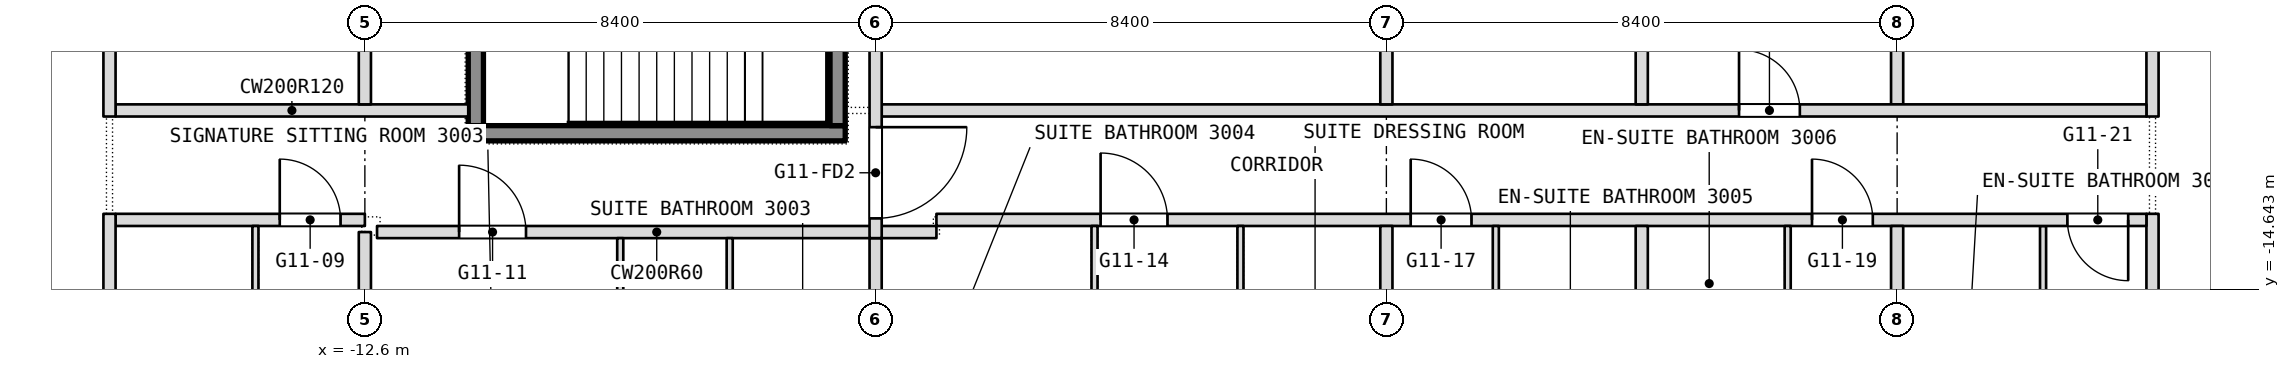
"""IFC4 building model, lengths in metres.
Left out: names, types, materials, properties, quantities, classifications, styles, units other than length and angle.
Written with IfcOpenShell. Run it as: python <this file> out.ifc"""

import sys

from ifc_helpers import new_model, si_unit, direction, frame, frame_2d, origin, place, context, subcontext, project, spatial, rectangle, extrude, element, fill, save


model = new_model("IFC4")
c1 = context("Model", 3, precision=1e-05, world=origin(), true_north=direction((0.0, 1.0)))
c2 = subcontext(c1, "Body", "Model", "MODEL_VIEW")
j1 = project(units=[si_unit("LENGTHUNIT", "METRE"), si_unit("PLANEANGLEUNIT", "RADIAN")], contexts=[c1])
p1 = place(None, origin())
s1 = spatial("IfcSite", under=j1, at=p1, CompositionType="ELEMENT")
p2 = place(p1, origin())
s2 = spatial("IfcBuilding", under=s1, at=p2, CompositionType="ELEMENT")
p3 = place(p2, frame((0.0, 0.0, 133.7)))
s3 = spatial("IfcBuildingStorey", under=s2, at=p3, CompositionType="ELEMENT", Elevation=133.7)
p4 = place(p3, frame((16.8, -22.186, 0.0), z_axis=(0.0, 0.0, 1.0), x_axis=(0.0, 1.0, 0.0)))
e1 = element("IfcWall", 1, at=p4, inside=s3, PredefinedType="PARTITIONING", context=c2, shape_type="SweptSolid", body=[
    extrude(rectangle(XDim=8.786, YDim=0.2, at=frame_2d((4.393, 0.0))), origin(), (0.0, 0.0, 1.0), 3.34),
])
p5 = place(p3, frame((16.8, -11.8, 0.0), z_axis=(0.0, 0.0, 1.0), x_axis=(0.0, 1.0, 0.0)))
e2 = element("IfcWall", 2, at=p5, inside=s3, PredefinedType="PARTITIONING", context=c2, shape_type="SweptSolid", body=[
    extrude(rectangle(XDim=9.9, YDim=0.2, at=frame_2d((4.95, 0.0))), origin(), (0.0, 0.0, 1.0), 3.34),
])
p6 = place(p3, frame((15.0, -17.35, 0.0), z_axis=(0.0, 0.0, 1.0), x_axis=(0.0, 1.0, 0.0)))
e3 = element("IfcWall", 3, at=p6, inside=s3, PredefinedType="PARTITIONING", context=c2, shape_type="SweptSolid", body=[
    extrude(rectangle(XDim=3.75, YDim=0.1, at=frame_2d((1.875, 0.0))), origin(), (0.0, 0.0, 1.0), 3.34),
])
p7 = place(p3, frame((-12.4, -13.7, 0.0), z_axis=(0.0, 0.0, 1.0), x_axis=(1.0, 0.0, 0.0)))
e4 = element("IfcWall", 4, at=p7, inside=s3, PredefinedType="PARTITIONING", context=c2, shape_type="SweptSolid", body=[
    extrude(rectangle(XDim=9.2, YDim=0.2, at=frame_2d((4.6, 0.0))), origin(), (0.0, 0.0, 1.0), 3.34),
])
p8 = place(p7, frame((1.35, 0.0, 0.0)))
e5 = element("IfcOpeningElement", 5, at=p8, cuts=e4, PredefinedType="OPENING", context=c2, shape_type="SweptSolid", body=[
    extrude(rectangle(XDim=1.1, YDim=2.1, at=frame_2d((0.55, 1.05))), frame((0.0, 0.1, 0.0), z_axis=(0.0, -1.0, 0.0), x_axis=(1.0, 0.0, 0.0)), (0.0, 0.0, 1.0), 0.2),
])
p9 = place(p3, frame((-16.7, -13.5, 0.0), z_axis=(0.0, 0.0, 1.0), x_axis=(1.0, 0.0, 0.0)))
e6 = element("IfcWall", 6, at=p9, inside=s3, PredefinedType="PARTITIONING", context=c2, shape_type="SweptSolid", body=[
    extrude(rectangle(XDim=4.1, YDim=0.2, at=frame_2d((2.05, 0.0))), origin(), (0.0, 0.0, 1.0), 3.34),
])
p10 = place(p9, frame((2.7, 0.0, 0.0)))
e7 = element("IfcOpeningElement", 7, at=p10, cuts=e6, PredefinedType="OPENING", context=c2, shape_type="SweptSolid", body=[
    extrude(rectangle(XDim=1.0, YDim=2.1, at=frame_2d((0.5, 1.05))), frame((0.0, 0.1, 0.0), z_axis=(0.0, -1.0, 0.0), x_axis=(1.0, 0.0, 0.0)), (0.0, 0.0, 1.0), 0.2),
])
p11 = place(p3, frame((-3.2, -13.5, 0.0), z_axis=(0.0, 0.0, 1.0), x_axis=(1.0, 0.0, 0.0)))
e8 = element("IfcWall", 8, at=p11, inside=s3, PredefinedType="PARTITIONING", context=c2, shape_type="SweptSolid", body=[
    extrude(rectangle(XDim=19.9, YDim=0.2, at=frame_2d((9.95, 0.0))), origin(), (0.0, 0.0, 1.0), 3.34),
])
p12 = place(p11, frame((2.7, 0.0, 0.0)))
e9 = element("IfcOpeningElement", 9, at=p12, cuts=e8, PredefinedType="OPENING", context=c2, shape_type="SweptSolid", body=[
    extrude(rectangle(XDim=1.1, YDim=2.1, at=frame_2d((0.55, 1.05))), frame((0.0, 0.1, 0.0), z_axis=(0.0, -1.0, 0.0), x_axis=(1.0, 0.0, 0.0)), (0.0, 0.0, 1.0), 0.2),
])
p13 = place(p11, frame((7.8, 0.0, 0.0)))
e10 = element("IfcOpeningElement", 10, at=p13, cuts=e8, PredefinedType="OPENING", context=c2, shape_type="SweptSolid", body=[
    extrude(rectangle(XDim=1.0, YDim=2.1, at=frame_2d((0.5, 1.05))), frame((0.0, 0.1, 0.0), z_axis=(0.0, -1.0, 0.0), x_axis=(1.0, 0.0, 0.0)), (0.0, 0.0, 1.0), 0.2),
])
p14 = place(p11, frame((14.4, 0.0, 0.0)))
e11 = element("IfcOpeningElement", 11, at=p14, cuts=e8, PredefinedType="OPENING", context=c2, shape_type="SweptSolid", body=[
    extrude(rectangle(XDim=1.0, YDim=2.1, at=frame_2d((0.5, 1.05))), frame((0.0, 0.1, 0.0), z_axis=(0.0, -1.0, 0.0), x_axis=(1.0, 0.0, 0.0)), (0.0, 0.0, 1.0), 0.2),
])
p15 = place(p11, frame((18.6, 0.0, 0.0)))
e12 = element("IfcOpeningElement", 12, at=p15, cuts=e8, PredefinedType="OPENING", context=c2, shape_type="SweptSolid", body=[
    extrude(rectangle(XDim=1.0, YDim=2.1, at=frame_2d((0.5, 1.05))), frame((0.0, 0.1, 0.0), z_axis=(0.0, -1.0, 0.0), x_axis=(1.0, 0.0, 0.0)), (0.0, 0.0, 1.0), 0.2),
])
p16 = place(p3, frame((12.6, -21.175, 0.0), z_axis=(0.0, 0.0, 1.0), x_axis=(0.0, 1.0, 0.0)))
e13 = element("IfcWall", 13, at=p16, inside=s3, PredefinedType="PARTITIONING", context=c2, shape_type="SweptSolid", body=[
    extrude(rectangle(XDim=7.575, YDim=0.2, at=frame_2d((3.788, 0.0))), origin(), (0.0, 0.0, 1.0), 3.34),
])
p17 = place(p3, frame((12.6, -11.6, 0.0), z_axis=(0.0, 0.0, 1.0), x_axis=(0.0, 1.0, 0.0)))
e14 = element("IfcWall", 14, at=p17, inside=s3, PredefinedType="PARTITIONING", context=c2, shape_type="SweptSolid", body=[
    extrude(rectangle(XDim=3.9, YDim=0.2, at=frame_2d((1.95, 0.0))), origin(), (0.0, 0.0, 1.0), 3.34),
])
p18 = place(p3, frame((-16.7, -11.7, 0.0), z_axis=(0.0, 0.0, 1.0), x_axis=(1.0, 0.0, 0.0)))
e15 = element("IfcWall", 15, at=p18, inside=s3, PredefinedType="PARTITIONING", context=c2, shape_type="SweptSolid", body=[
    extrude(rectangle(XDim=5.8, YDim=0.2, at=frame_2d((2.9, 0.0))), origin(), (0.0, 0.0, 1.0), 3.34),
])
p19 = place(p3, frame((-4.1, -11.7, 0.0), z_axis=(0.0, 0.0, 1.0), x_axis=(1.0, 0.0, 0.0)))
e16 = element("IfcWall", 16, at=p19, inside=s3, PredefinedType="PARTITIONING", context=c2, shape_type="SweptSolid", body=[
    extrude(rectangle(XDim=20.8, YDim=0.2, at=frame_2d((10.4, 0.0))), origin(), (0.0, 0.0, 1.0), 3.34),
])
p20 = place(p19, frame((14.1, 0.0, 0.0)))
e17 = element("IfcOpeningElement", 17, at=p20, cuts=e16, PredefinedType="OPENING", context=c2, shape_type="SweptSolid", body=[
    extrude(rectangle(XDim=1.0, YDim=2.1, at=frame_2d((0.5, 1.05))), frame((0.0, 0.1, 0.0), z_axis=(0.0, -1.0, 0.0), x_axis=(1.0, 0.0, 0.0)), (0.0, 0.0, 1.0), 0.2),
])
p21 = place(p3, frame((10.8, -16.45, 0.0), z_axis=(0.0, 0.0, 1.0), x_axis=(0.0, 1.0, 0.0)))
e18 = element("IfcWall", 18, at=p21, inside=s3, PredefinedType="PARTITIONING", context=c2, shape_type="SweptSolid", body=[
    extrude(rectangle(XDim=2.85, YDim=0.1, at=frame_2d((1.425, 0.0))), origin(), (0.0, 0.0, 1.0), 3.34),
])
p22 = place(p3, frame((8.4, -23.3, 0.0), z_axis=(0.0, 0.0, 1.0), x_axis=(0.0, 1.0, 0.0)))
e19 = element("IfcWall", 19, at=p22, inside=s3, PredefinedType="PARTITIONING", context=c2, shape_type="SweptSolid", body=[
    extrude(rectangle(XDim=9.7, YDim=0.2, at=frame_2d((4.85, 0.0))), origin(), (0.0, 0.0, 1.0), 3.34),
])
p23 = place(p3, frame((8.4, -11.6, 0.0), z_axis=(0.0, 0.0, 1.0), x_axis=(0.0, 1.0, 0.0)))
e20 = element("IfcWall", 20, at=p23, inside=s3, PredefinedType="PARTITIONING", context=c2, shape_type="SweptSolid", body=[
    extrude(rectangle(XDim=3.8, YDim=0.2, at=frame_2d((1.9, 0.0))), origin(), (0.0, 0.0, 1.0), 3.34),
])
p24 = place(p3, frame((6.0, -16.95, 0.0), z_axis=(0.0, 0.0, 1.0), x_axis=(0.0, 1.0, 0.0)))
e21 = element("IfcWall", 21, at=p24, inside=s3, PredefinedType="PARTITIONING", context=c2, shape_type="SweptSolid", body=[
    extrude(rectangle(XDim=3.35, YDim=0.1, at=frame_2d((1.675, 0.0))), origin(), (0.0, 0.0, 1.0), 3.34),
])
p25 = place(p3, frame((4.2, -23.3, 0.0), z_axis=(0.0, 0.0, 1.0), x_axis=(0.0, 1.0, 0.0)))
e22 = element("IfcWall", 22, at=p25, inside=s3, PredefinedType="PARTITIONING", context=c2, shape_type="SweptSolid", body=[
    extrude(rectangle(XDim=9.7, YDim=0.2, at=frame_2d((4.85, 0.0))), origin(), (0.0, 0.0, 1.0), 3.34),
])
p26 = place(p3, frame((4.2, -11.6, 0.0), z_axis=(0.0, 0.0, 1.0), x_axis=(0.0, 1.0, 0.0)))
e23 = element("IfcWall", 23, at=p26, inside=s3, PredefinedType="PARTITIONING", context=c2, shape_type="SweptSolid", body=[
    extrude(rectangle(XDim=9.7, YDim=0.2, at=frame_2d((4.85, 0.0))), origin(), (0.0, 0.0, 1.0), 3.34),
])
p27 = place(p3, frame((1.8, -17.15, 0.0), z_axis=(0.0, 0.0, 1.0), x_axis=(0.0, 1.0, 0.0)))
e24 = element("IfcWall", 24, at=p27, inside=s3, PredefinedType="PARTITIONING", context=c2, shape_type="SweptSolid", body=[
    extrude(rectangle(XDim=3.55, YDim=0.1, at=frame_2d((1.775, 0.0))), origin(), (0.0, 0.0, 1.0), 3.34),
])
p28 = place(p3, frame((-0.6, -17.95, 0.0), z_axis=(0.0, 0.0, 1.0), x_axis=(0.0, 1.0, 0.0)))
e25 = element("IfcWall", 25, at=p28, inside=s3, PredefinedType="PARTITIONING", context=c2, shape_type="SweptSolid", body=[
    extrude(rectangle(XDim=4.35, YDim=0.1, at=frame_2d((2.175, 0.0))), origin(), (0.0, 0.0, 1.0), 3.34),
])
p29 = place(p28, frame((1.3, 0.0, 0.0)))
e26 = element("IfcOpeningElement", 26, at=p29, cuts=e25, PredefinedType="OPENING", context=c2, shape_type="SweptSolid", body=[
    extrude(rectangle(XDim=0.9, YDim=2.1, at=frame_2d((0.45, 1.05))), frame((0.0, 0.05, 0.0), z_axis=(0.0, -1.0, 0.0), x_axis=(1.0, 0.0, 0.0)), (0.0, 0.0, 1.0), 0.1),
])
p30 = place(p3, frame((-4.2, -23.3, 0.0), z_axis=(0.0, 0.0, 1.0), x_axis=(0.0, 1.0, 0.0)))
e27 = element("IfcWall", 27, at=p30, inside=s3, PredefinedType="PARTITIONING", context=c2, shape_type="SweptSolid", body=[
    extrude(rectangle(XDim=9.5, YDim=0.2, at=frame_2d((4.75, 0.0))), origin(), (0.0, 0.0, 1.0), 3.34),
])
p31 = place(p3, frame((-4.2, -13.8, 0.0), z_axis=(0.0, 0.0, 1.0), x_axis=(0.0, 1.0, 0.0)))
e28 = element("IfcWall", 28, at=p31, inside=s3, PredefinedType="PARTITIONING", context=c2, shape_type="SweptSolid", body=[
    extrude(rectangle(XDim=13.8, YDim=0.2, at=frame_2d((6.9, 0.0))), origin(), (0.0, 0.0, 1.0), 3.34),
])
p32 = place(p31, frame((12.15, 0.0, 0.0)))
e29 = element("IfcOpeningElement", 29, at=p32, cuts=e28, PredefinedType="OPENING", context=c2, shape_type="SweptSolid", body=[
    extrude(rectangle(XDim=1.5, YDim=2.1, at=frame_2d((0.75, 1.05))), frame((0.0, 0.1, 0.0), z_axis=(0.0, -1.0, 0.0), x_axis=(1.0, 0.0, 0.0)), (0.0, 0.0, 1.0), 0.2),
])
p33 = place(p31, frame((0.325, 0.0, 0.0)))
e30 = element("IfcOpeningElement", 30, at=p33, cuts=e28, PredefinedType="OPENING", context=c2, shape_type="SweptSolid", body=[
    extrude(rectangle(XDim=1.5, YDim=2.1, at=frame_2d((0.75, 1.05))), frame((0.0, 0.1, 0.0), z_axis=(0.0, -1.0, 0.0), x_axis=(1.0, 0.0, 0.0)), (0.0, 0.0, 1.0), 0.2),
])
p34 = place(p3, frame((-6.6, -17.35, 0.0), z_axis=(0.0, 0.0, 1.0), x_axis=(0.0, 1.0, 0.0)))
e31 = element("IfcWall", 31, at=p34, inside=s3, PredefinedType="PARTITIONING", context=c2, shape_type="SweptSolid", body=[
    extrude(rectangle(XDim=3.55, YDim=0.1, at=frame_2d((1.775, 0.0))), origin(), (0.0, 0.0, 1.0), 3.34),
])
p35 = place(p3, frame((-8.4, -23.3, 0.0), z_axis=(0.0, 0.0, 1.0), x_axis=(0.0, 1.0, 0.0)))
e32 = element("IfcWall", 32, at=p35, inside=s3, PredefinedType="PARTITIONING", context=c2, shape_type="SweptSolid", body=[
    extrude(rectangle(XDim=9.5, YDim=0.1, at=frame_2d((4.75, 0.0))), origin(), (0.0, 0.0, 1.0), 3.34),
])
p36 = place(p35, frame((3.57, 0.0, 0.0)))
e33 = element("IfcOpeningElement", 33, at=p36, cuts=e32, PredefinedType="OPENING", context=c2, shape_type="SweptSolid", body=[
    extrude(rectangle(XDim=0.9, YDim=2.1, at=frame_2d((0.45, 1.05))), frame((0.0, 0.05, 0.0), z_axis=(0.0, -1.0, 0.0), x_axis=(1.0, 0.0, 0.0)), (0.0, 0.0, 1.0), 0.1),
])
p37 = place(p3, frame((-12.6, -21.175, 0.0), z_axis=(0.0, 0.0, 1.0), x_axis=(0.0, 1.0, 0.0)))
e34 = element("IfcWall", 34, at=p37, inside=s3, PredefinedType="PARTITIONING", context=c2, shape_type="SweptSolid", body=[
    extrude(rectangle(XDim=7.475, YDim=0.2, at=frame_2d((3.738, 0.0))), origin(), (0.0, 0.0, 1.0), 3.34),
])
p38 = place(p3, frame((-12.6, -11.6, 0.0), z_axis=(0.0, 0.0, 1.0), x_axis=(0.0, 1.0, 0.0)))
e35 = element("IfcWall", 35, at=p38, inside=s3, PredefinedType="PARTITIONING", context=c2, shape_type="SweptSolid", body=[
    extrude(rectangle(XDim=9.7, YDim=0.2, at=frame_2d((4.85, 0.0))), origin(), (0.0, 0.0, 1.0), 3.34),
])
p39 = place(p3, frame((-14.4, -16.85, 0.0), z_axis=(0.0, 0.0, 1.0), x_axis=(0.0, 1.0, 0.0)))
e36 = element("IfcWall", 36, at=p39, inside=s3, PredefinedType="PARTITIONING", context=c2, shape_type="SweptSolid", body=[
    extrude(rectangle(XDim=3.25, YDim=0.1, at=frame_2d((1.625, 0.0))), origin(), (0.0, 0.0, 1.0), 3.34),
])
p40 = place(p3, frame((-16.8, -22.186, 0.0), z_axis=(0.0, 0.0, 1.0), x_axis=(0.0, 1.0, 0.0)))
e37 = element("IfcWall", 37, at=p40, inside=s3, PredefinedType="PARTITIONING", context=c2, shape_type="SweptSolid", body=[
    extrude(rectangle(XDim=8.786, YDim=0.2, at=frame_2d((4.393, 0.0))), origin(), (0.0, 0.0, 1.0), 3.34),
])
p41 = place(p3, frame((-16.8, -11.8, 0.0), z_axis=(0.0, 0.0, 1.0), x_axis=(0.0, 1.0, 0.0)))
e38 = element("IfcWall", 38, at=p41, inside=s3, PredefinedType="PARTITIONING", context=c2, shape_type="SweptSolid", body=[
    extrude(rectangle(XDim=9.9, YDim=0.2, at=frame_2d((4.95, 0.0))), origin(), (0.0, 0.0, 1.0), 3.34),
])
p42 = place(p3, frame((-10.9, -12.075, 0.1), z_axis=(0.0, 0.0, 1.0), x_axis=(1.0, 0.0, 0.0)))
e39 = element("IfcWall", 39, at=p42, inside=s3, PredefinedType="SHEAR", context=c2, shape_type="SweptSolid", body=[
    extrude(rectangle(XDim=6.2, YDim=0.25, at=frame_2d((3.1, 0.0))), origin(), (0.0, 0.0, 1.0), 3.6),
])
for number, where, z_axis, x_axis in (
    (40, (-10.775, -11.95, 0.1), (0.0, 0.0, 1.0), (0.0, 1.0, 0.0)),
    (41, (-4.825, -11.95, 0.1), (0.0, 0.0, 1.0), (0.0, 1.0, 0.0)),
):
    element("IfcWall", number, at=place(p3, frame(where, z_axis=z_axis, x_axis=x_axis)), inside=s3, PredefinedType="SHEAR", context=c2, shape_type="SweptSolid", body=[
        extrude(rectangle(XDim=2.9, YDim=0.25, at=frame_2d((1.45, 0.0))), origin(), (0.0, 0.0, 1.0), 3.6),
    ])
p43 = place(p8, origin())
e42 = element("IfcDoor", 42, at=p43, inside=s3, OperationType="SINGLE_SWING_RIGHT", PredefinedType="DOOR", context=c2, shape_type="SweptSolid", body=[
    extrude(rectangle(XDim=1.1, YDim=2.1, at=frame_2d((0.55, 1.05))), frame((0.0, 0.025, 0.0), z_axis=(0.0, -1.0, 0.0), x_axis=(1.0, 0.0, 0.0)), (0.0, 0.0, 1.0), 0.05),
])
fill(e5, e42)
p44 = place(p10, origin())
e43 = element("IfcDoor", 43, at=p44, inside=s3, OperationType="SINGLE_SWING_LEFT", PredefinedType="DOOR", context=c2, shape_type="SweptSolid", body=[
    extrude(rectangle(XDim=1.0, YDim=2.1, at=frame_2d((0.5, 1.05))), frame((0.0, 0.025, 0.0), z_axis=(0.0, -1.0, 0.0), x_axis=(1.0, 0.0, 0.0)), (0.0, 0.0, 1.0), 0.05),
])
fill(e7, e43)
p45 = place(p12, origin())
e44 = element("IfcDoor", 44, at=p45, inside=s3, OperationType="SINGLE_SWING_RIGHT", PredefinedType="DOOR", context=c2, shape_type="SweptSolid", body=[
    extrude(rectangle(XDim=1.1, YDim=2.1, at=frame_2d((0.55, 1.05))), frame((0.0, 0.025, 0.0), z_axis=(0.0, -1.0, 0.0), x_axis=(1.0, 0.0, 0.0)), (0.0, 0.0, 1.0), 0.05),
])
fill(e9, e44)
p46 = place(p13, origin())
e45 = element("IfcDoor", 45, at=p46, inside=s3, OperationType="SINGLE_SWING_LEFT", PredefinedType="DOOR", context=c2, shape_type="SweptSolid", body=[
    extrude(rectangle(XDim=1.0, YDim=2.1, at=frame_2d((0.5, 1.05))), frame((0.0, 0.025, 0.0), z_axis=(0.0, -1.0, 0.0), x_axis=(1.0, 0.0, 0.0)), (0.0, 0.0, 1.0), 0.05),
])
fill(e10, e45)
p47 = place(p14, origin())
e46 = element("IfcDoor", 46, at=p47, inside=s3, OperationType="SINGLE_SWING_LEFT", PredefinedType="DOOR", context=c2, shape_type="SweptSolid", body=[
    extrude(rectangle(XDim=1.0, YDim=2.1, at=frame_2d((0.5, 1.05))), frame((0.0, 0.025, 0.0), z_axis=(0.0, -1.0, 0.0), x_axis=(1.0, 0.0, 0.0)), (0.0, 0.0, 1.0), 0.05),
])
fill(e11, e46)
p48 = place(p15, origin())
e47 = element("IfcDoor", 47, at=p48, inside=s3, OperationType="SINGLE_SWING_LEFT", PredefinedType="DOOR", context=c2, shape_type="SweptSolid", body=[
    extrude(rectangle(XDim=1.0, YDim=2.1, at=frame_2d((0.5, 1.05))), frame((0.0, 0.025, 0.0), z_axis=(0.0, -1.0, 0.0), x_axis=(1.0, 0.0, 0.0)), (0.0, 0.0, 1.0), 0.05),
])
fill(e12, e47)
p49 = place(p20, origin())
e48 = element("IfcDoor", 48, at=p49, inside=s3, OperationType="SINGLE_SWING_LEFT", PredefinedType="DOOR", context=c2, shape_type="SweptSolid", body=[
    extrude(rectangle(XDim=1.0, YDim=2.1, at=frame_2d((0.5, 1.05))), frame((0.0, 0.025, 0.0), z_axis=(0.0, -1.0, 0.0), x_axis=(1.0, 0.0, 0.0)), (0.0, 0.0, 1.0), 0.05),
])
fill(e17, e48)
p50 = place(p33, origin())
e49 = element("IfcDoor", 49, at=p50, inside=s3, OperationType="DOUBLE_DOOR_DOUBLE_SWING", PredefinedType="DOOR", context=c2, shape_type="SweptSolid", body=[
    extrude(rectangle(XDim=1.5, YDim=2.1, at=frame_2d((0.75, 1.05))), frame((0.0, 0.025, 0.0), z_axis=(0.0, -1.0, 0.0), x_axis=(1.0, 0.0, 0.0)), (0.0, 0.0, 1.0), 0.05),
])
fill(e30, e49)
save(model, sys.argv[1])
